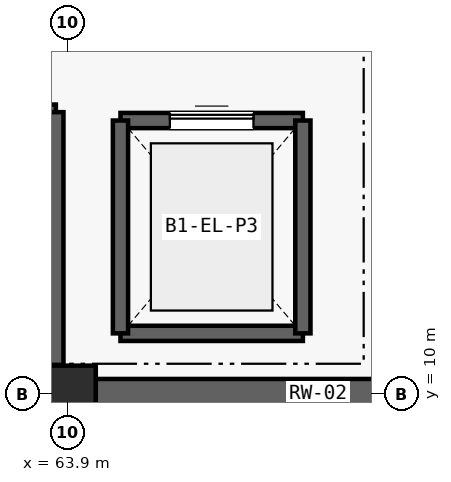
"""IFC4 building model, lengths in metres.
Left out: names, types, materials, properties, quantities, classifications, styles, units other than length and angle.
Written with IfcOpenShell. Run it as: python <this file> out.ifc"""

import sys

from ifc_helpers import new_model, si_unit, direction, frame, frame_2d, origin, origin_2d, place, context, subcontext, project, spatial, rectangle, extrude, element, fill, save


model = new_model("IFC4")
c1 = context("Model", 3, precision=1e-05, world=origin(), true_north=direction((0.0, 1.0)))
c2 = subcontext(c1, "Body", "Model", "MODEL_VIEW")
j1 = project(units=[si_unit("LENGTHUNIT", "METRE"), si_unit("PLANEANGLEUNIT", "RADIAN")], contexts=[c1])
p1 = place(None, origin())
s1 = spatial("IfcSite", under=j1, at=p1, CompositionType="ELEMENT")
p2 = place(p1, origin())
s2 = spatial("IfcBuilding", under=s1, at=p2, CompositionType="ELEMENT")
p3 = place(p2, frame((0.0, 0.0, -4.2)))
s3 = spatial("IfcBuildingStorey", under=s2, at=p3, CompositionType="ELEMENT", Elevation=-4.2)
p4 = place(p3, frame((63.9, 10.0, -0.4), z_axis=(0.0, 0.0, 1.0), x_axis=(1.0, 0.0, 0.0)))
e1 = element("IfcColumn", 1, at=p4, inside=s3, PredefinedType="COLUMN", context=c2, shape_type="SweptSolid", body=[
    extrude(rectangle(XDim=0.75, YDim=0.75, at=origin_2d()), origin(), (0.0, 0.0, 1.0), 4.6),
])
p5 = place(p3, frame((64.275, 10.0, 0.0), z_axis=(0.0, 0.0, 1.0), x_axis=(1.0, 0.0, 0.0)))
e2 = element("IfcWall", 2, at=p5, inside=s3, PredefinedType="SHEAR", context=c2, shape_type="SweptSolid", body=[
    extrude(rectangle(XDim=5.85, YDim=0.4, at=frame_2d((2.925, 0.0))), origin(), (0.0, 0.0, 1.0), 3.85),
])
p6 = place(p3, frame((57.45, 10.35, -0.4), z_axis=(0.0, 0.0, 1.0), x_axis=(1.0, 0.0, 0.0)))
e3 = element("IfcWall", 3, at=p6, inside=s3, PredefinedType="SHEAR", context=c2, shape_type="SweptSolid", body=[
    extrude(rectangle(XDim=6.3, YDim=0.2, at=frame_2d((3.15, 0.0))), origin(), (0.0, 0.0, 1.0), 4.6),
])
p7 = place(p3, frame((57.45, 13.71, -0.4), z_axis=(0.0, 0.0, 1.0), x_axis=(1.0, 0.0, 0.0)))
e4 = element("IfcWall", 4, at=p7, inside=s3, PredefinedType="SHEAR", context=c2, shape_type="SweptSolid", body=[
    extrude(rectangle(XDim=6.3, YDim=0.2, at=frame_2d((3.15, 0.0))), origin(), (0.0, 0.0, 1.0), 4.6),
])
p8 = place(p7, frame((0.32, 0.0, 0.4)))
e5 = element("IfcOpeningElement", 5, at=p8, cuts=e4, PredefinedType="OPENING", context=c2, shape_type="SweptSolid", body=[
    extrude(rectangle(XDim=1.2, YDim=2.15, at=frame_2d((0.6, 1.075))), frame((0.0, 0.11, 0.0), z_axis=(0.0, -1.0, 0.0), x_axis=(1.0, 0.0, 0.0)), (0.0, 0.0, 1.0), 0.22),
])
p9 = place(p3, frame((63.75, 10.35, -0.4), z_axis=(0.0, 0.0, 1.0), x_axis=(0.0, 1.0, 0.0)))
e6 = element("IfcWall", 6, at=p9, inside=s3, PredefinedType="SHEAR", context=c2, shape_type="SweptSolid", body=[
    extrude(rectangle(XDim=3.36, YDim=0.2, at=frame_2d((1.68, 0.0))), origin(), (0.0, 0.0, 1.0), 4.6),
])
p10 = place(p3, frame((64.6, 10.8, -0.4), z_axis=(0.0, 0.0, 1.0), x_axis=(1.0, 0.0, 0.0)))
e7 = element("IfcWall", 7, at=p10, inside=s3, PredefinedType="SHEAR", context=c2, shape_type="SweptSolid", body=[
    extrude(rectangle(XDim=2.4, YDim=0.2, at=frame_2d((1.2, 0.0))), origin(), (0.0, 0.0, 1.0), 4.6),
])
p11 = place(p3, frame((64.6, 13.6, -0.4), z_axis=(0.0, 0.0, 1.0), x_axis=(1.0, 0.0, 0.0)))
e8 = element("IfcWall", 8, at=p11, inside=s3, PredefinedType="SHEAR", context=c2, shape_type="SweptSolid", body=[
    extrude(rectangle(XDim=2.4, YDim=0.2, at=frame_2d((1.2, 0.0))), origin(), (0.0, 0.0, 1.0), 4.6),
])
p12 = place(p11, frame((0.65, 0.0, 0.4)))
e9 = element("IfcOpeningElement", 9, at=p12, cuts=e8, PredefinedType="OPENING", context=c2, shape_type="SweptSolid", body=[
    extrude(rectangle(XDim=1.1, YDim=2.15, at=frame_2d((0.55, 1.075))), frame((0.0, 0.11, 0.0), z_axis=(0.0, -1.0, 0.0), x_axis=(1.0, 0.0, 0.0)), (0.0, 0.0, 1.0), 0.22),
])
for number, where, z_axis, x_axis in (
    (10, (64.6, 10.8, -0.4), (0.0, 0.0, 1.0), (0.0, 1.0, 0.0)),
    (11, (67.0, 10.8, -0.4), (0.0, 0.0, 1.0), (0.0, 1.0, 0.0)),
):
    element("IfcWall", number, at=place(p3, frame(where, z_axis=z_axis, x_axis=x_axis)), inside=s3, PredefinedType="SHEAR", context=c2, shape_type="SweptSolid", body=[
        extrude(rectangle(XDim=2.8, YDim=0.2, at=frame_2d((1.4, 0.0))), origin(), (0.0, 0.0, 1.0), 4.6),
    ])
p13 = place(p12, origin())
e12 = element("IfcDoor", 12, at=p13, inside=s3, OperationType="SLIDING_TO_LEFT", PredefinedType="DOOR", context=c2, shape_type="SweptSolid", body=[
    extrude(rectangle(XDim=1.1, YDim=2.15, at=frame_2d((0.55, 1.075))), frame((0.0, 0.025, 0.0), z_axis=(0.0, -1.0, 0.0), x_axis=(1.0, 0.0, 0.0)), (0.0, 0.0, 1.0), 0.05),
])
fill(e9, e12)
save(model, sys.argv[1])
